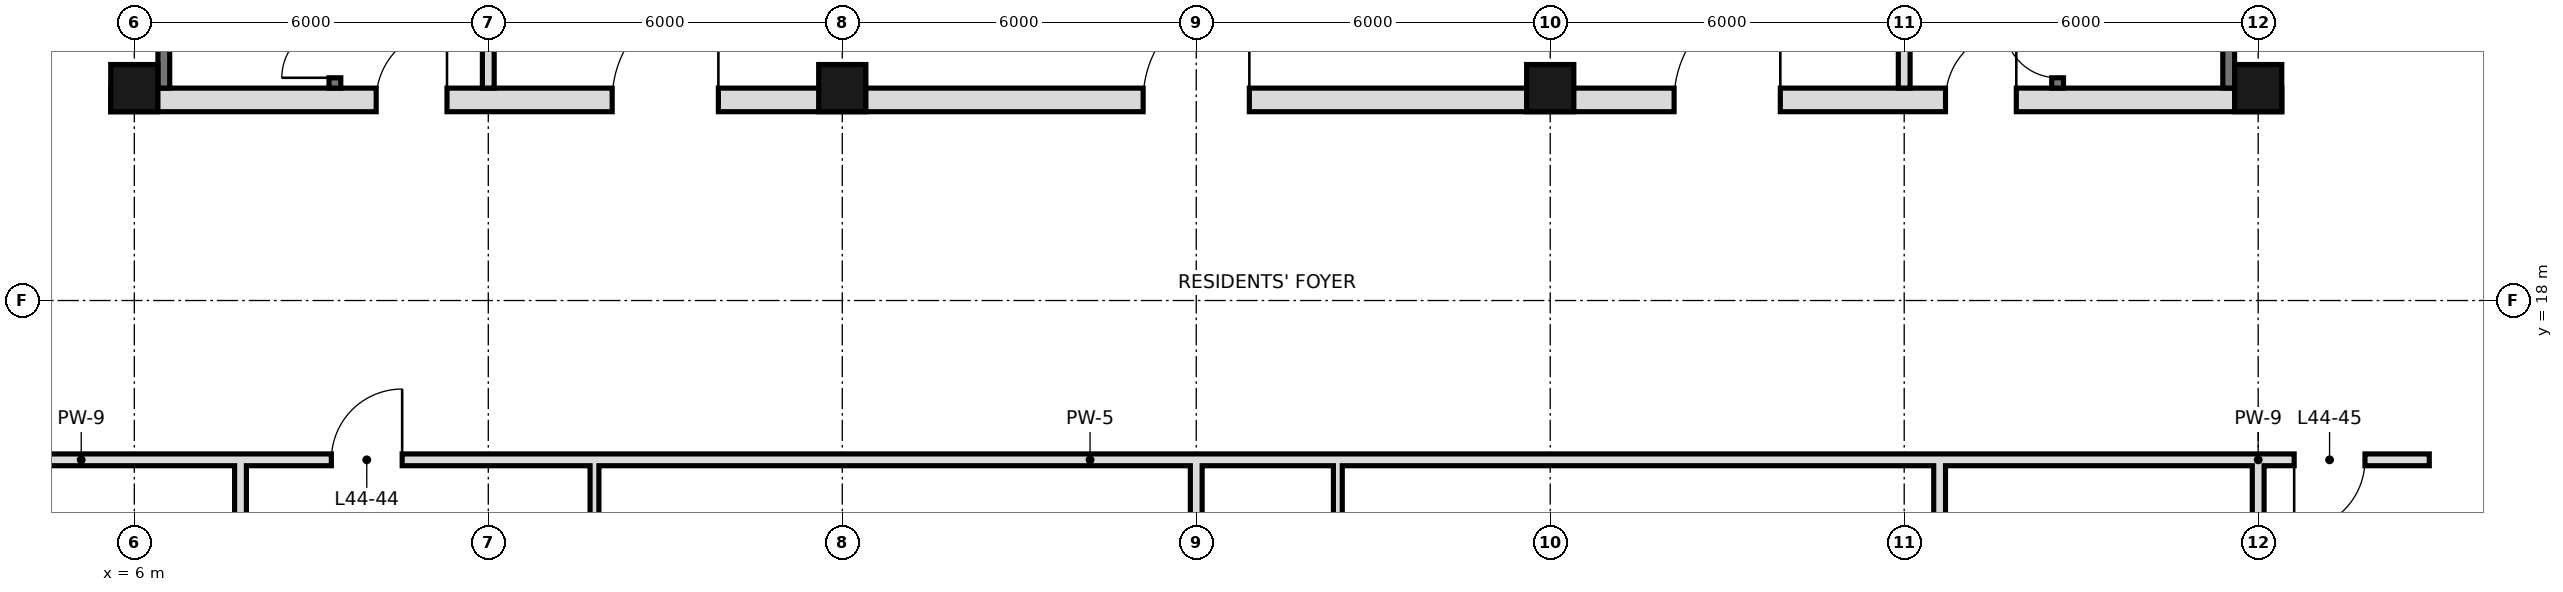
"""IFC4 building model, lengths in metres.
Left out: names, types, materials, properties, quantities, classifications, styles, units other than length and angle.
Written with IfcOpenShell. Run it as: python <this file> out.ifc"""

import sys

from ifc_helpers import new_model, si_unit, direction, frame, frame_2d, origin, origin_2d, place, context, subcontext, project, spatial, rectangle, hollow_rectangle, extrude, element, fill, save


model = new_model("IFC4")
c1 = context("Model", 3, precision=1e-05, world=origin(), true_north=direction((0.0, 1.0)))
c2 = subcontext(c1, "Body", "Model", "MODEL_VIEW")
j1 = project(units=[si_unit("LENGTHUNIT", "METRE"), si_unit("PLANEANGLEUNIT", "RADIAN")], contexts=[c1])
p1 = place(None, origin())
s1 = spatial("IfcSite", under=j1, at=p1, CompositionType="ELEMENT")
p2 = place(p1, origin())
s2 = spatial("IfcBuilding", under=s1, at=p2, CompositionType="ELEMENT")
p3 = place(p2, frame((0.0, 0.0, 192.0)))
s3 = spatial("IfcBuildingStorey", under=s2, at=p3, CompositionType="ELEMENT", Elevation=192.0)
for number, where, z_axis, x_axis in (
    (1, (6.0, 21.6, 0.0), (0.0, 0.0, 1.0), (1.0, 0.0, 0.0)),
    (2, (18.0, 21.6, 0.0), (0.0, 0.0, 1.0), (1.0, 0.0, 0.0)),
    (3, (30.0, 21.6, 0.0), (0.0, 0.0, 1.0), (1.0, 0.0, 0.0)),
    (4, (42.0, 21.6, 0.0), (0.0, 0.0, 1.0), (1.0, 0.0, 0.0)),
):
    element("IfcColumn", number, at=place(p3, frame(where, z_axis=z_axis, x_axis=x_axis)), inside=s3, PredefinedType="COLUMN", context=c2, shape_type="SweptSolid", body=[
        extrude(hollow_rectangle(XDim=0.8, YDim=0.8, WallThickness=0.045, at=origin_2d()), origin(), (0.0, 0.0, 1.0), 3.6),
    ])
p4 = place(p3, frame((13.8, 10.8, 0.0), z_axis=(0.0, 0.0, 1.0), x_axis=(0.0, 1.0, 0.0)))
e5 = element("IfcWall", 5, at=p4, inside=s3, PredefinedType="PARTITIONING", context=c2, shape_type="SweptSolid", body=[
    extrude(rectangle(XDim=4.5, YDim=0.15, at=frame_2d((2.25, 0.0))), origin(), (0.0, 0.0, 1.0), 3.42),
])
p5 = place(p3, frame((24.0, 0.0, 0.0), z_axis=(0.0, 0.0, 1.0), x_axis=(0.0, 1.0, 0.0)))
e6 = element("IfcWall", 6, at=p5, inside=s3, PredefinedType="SOLIDWALL", context=c2, shape_type="SweptSolid", body=[
    extrude(rectangle(XDim=15.3, YDim=0.2, at=frame_2d((7.65, 0.0))), origin(), (0.0, 0.0, 1.0), 2.72),
])
p6 = place(p3, frame((26.4, 10.8, 0.0), z_axis=(0.0, 0.0, 1.0), x_axis=(0.0, 1.0, 0.0)))
e7 = element("IfcWall", 7, at=p6, inside=s3, PredefinedType="PARTITIONING", context=c2, shape_type="SweptSolid", body=[
    extrude(rectangle(XDim=4.5, YDim=0.15, at=frame_2d((2.25, 0.0))), origin(), (0.0, 0.0, 1.0), 3.42),
])
for number, where, z_axis, x_axis in (
    (8, (36.6, 10.8, 0.0), (0.0, 0.0, 1.0), (0.0, 1.0, 0.0)),
    (9, (42.0, 10.8, 0.0), (0.0, 0.0, 1.0), (0.0, 1.0, 0.0)),
    (10, (7.8, 10.8, 0.0), (0.0, 0.0, 1.0), (0.0, 1.0, 0.0)),
):
    element("IfcWall", number, at=place(p3, frame(where, z_axis=z_axis, x_axis=x_axis)), inside=s3, PredefinedType="SOLIDWALL", context=c2, shape_type="SweptSolid", body=[
        extrude(rectangle(XDim=4.5, YDim=0.2, at=frame_2d((2.25, 0.0))), origin(), (0.0, 0.0, 1.0), 2.72),
    ])
p7 = place(p3, frame((7.8, 15.3, 0.0), z_axis=(0.0, 0.0, 1.0), x_axis=(1.0, 0.0, 0.0)))
e11 = element("IfcWall", 11, at=p7, inside=s3, PredefinedType="SOLIDWALL", context=c2, shape_type="SweptSolid", body=[
    extrude(rectangle(XDim=28.8, YDim=0.2, at=frame_2d((14.4, 0.0))), origin(), (0.0, 0.0, 1.0), 2.72),
])
p8 = place(p7, frame((1.54, 0.0, 0.0)))
e12 = element("IfcOpeningElement", 12, at=p8, cuts=e11, PredefinedType="OPENING", context=c2, shape_type="SweptSolid", body=[
    extrude(rectangle(XDim=1.2, YDim=2.4, at=frame_2d((0.6, 1.2))), frame((0.0, 0.11, 0.0), z_axis=(0.0, -1.0, 0.0), x_axis=(1.0, 0.0, 0.0)), (0.0, 0.0, 1.0), 0.22),
])
p9 = place(p3, frame((42.0, 15.3, 0.0), z_axis=(0.0, 0.0, 1.0), x_axis=(1.0, 0.0, 0.0)))
e13 = element("IfcWall", 13, at=p9, inside=s3, PredefinedType="SOLIDWALL", context=c2, shape_type="SweptSolid", body=[
    extrude(rectangle(XDim=2.9, YDim=0.2, at=frame_2d((1.45, 0.0))), origin(), (0.0, 0.0, 1.0), 2.72),
])
p10 = place(p9, frame((0.61, 0.0, 0.0)))
e14 = element("IfcOpeningElement", 14, at=p10, cuts=e13, PredefinedType="OPENING", context=c2, shape_type="SweptSolid", body=[
    extrude(rectangle(XDim=1.2, YDim=2.4, at=frame_2d((0.6, 1.2))), frame((0.0, 0.11, 0.0), z_axis=(0.0, -1.0, 0.0), x_axis=(1.0, 0.0, 0.0)), (0.0, 0.0, 1.0), 0.22),
])
p11 = place(p3, frame((3.1, 15.3, 0.0), z_axis=(0.0, 0.0, 1.0), x_axis=(1.0, 0.0, 0.0)))
e15 = element("IfcWall", 15, at=p11, inside=s3, PredefinedType="SOLIDWALL", context=c2, shape_type="SweptSolid", body=[
    extrude(rectangle(XDim=4.7, YDim=0.2, at=frame_2d((2.35, 0.0))), origin(), (0.0, 0.0, 1.0), 2.72),
])
p12 = place(p3, frame((36.6, 15.3, 0.0), z_axis=(0.0, 0.0, 1.0), x_axis=(1.0, 0.0, 0.0)))
e16 = element("IfcWall", 16, at=p12, inside=s3, PredefinedType="SOLIDWALL", context=c2, shape_type="SweptSolid", body=[
    extrude(rectangle(XDim=5.4, YDim=0.2, at=frame_2d((2.7, 0.0))), origin(), (0.0, 0.0, 1.0), 2.72),
])
for number, where, z_axis, x_axis in (
    (17, (6.5, 21.6, 0.0), (0.0, 0.0, 1.0), (0.0, 1.0, 0.0)),
    (18, (41.5, 21.6, 0.0), (0.0, 0.0, 1.0), (0.0, 1.0, 0.0)),
):
    element("IfcWall", number, at=place(p3, frame(where, z_axis=z_axis, x_axis=x_axis)), inside=s3, PredefinedType="SOLIDWALL", context=c2, shape_type="SweptSolid", body=[
        extrude(rectangle(XDim=23.5, YDim=0.2, at=frame_2d((11.75, 0.0))), origin(), (0.0, 0.0, 1.0), 3.42),
    ])
p13 = place(p3, frame((5.6, 21.4, 0.0), z_axis=(0.0, 0.0, 1.0), x_axis=(1.0, 0.0, 0.0)))
e19 = element("IfcWall", 19, at=p13, inside=s3, PredefinedType="SOLIDWALL", context=c2, shape_type="SweptSolid", body=[
    extrude(rectangle(XDim=36.8, YDim=0.4, at=frame_2d((18.4, 0.0))), origin(), (0.0, 0.0, 1.0), 3.42),
])
p14 = place(p13, frame((8.5, 0.0, 0.0)))
e20 = element("IfcOpeningElement", 20, at=p14, cuts=e19, PredefinedType="OPENING", context=c2, shape_type="SweptSolid", body=[
    extrude(rectangle(XDim=1.8, YDim=2.1, at=frame_2d((0.9, 1.05))), frame((0.0, 0.21, 0.0), z_axis=(0.0, -1.0, 0.0), x_axis=(1.0, 0.0, 0.0)), (0.0, 0.0, 1.0), 0.42),
])
p15 = place(p13, frame((17.5, 0.0, 0.0)))
e21 = element("IfcOpeningElement", 21, at=p15, cuts=e19, PredefinedType="OPENING", context=c2, shape_type="SweptSolid", body=[
    extrude(rectangle(XDim=1.8, YDim=2.1, at=frame_2d((0.9, 1.05))), frame((0.0, 0.21, 0.0), z_axis=(0.0, -1.0, 0.0), x_axis=(1.0, 0.0, 0.0)), (0.0, 0.0, 1.0), 0.42),
])
p16 = place(p13, frame((26.5, 0.0, 0.0)))
e22 = element("IfcOpeningElement", 22, at=p16, cuts=e19, PredefinedType="OPENING", context=c2, shape_type="SweptSolid", body=[
    extrude(rectangle(XDim=1.8, YDim=2.1, at=frame_2d((0.9, 1.05))), frame((0.0, 0.21, 0.0), z_axis=(0.0, -1.0, 0.0), x_axis=(1.0, 0.0, 0.0)), (0.0, 0.0, 1.0), 0.42),
])
p17 = place(p13, frame((4.5, 0.0, 0.0)))
e23 = element("IfcOpeningElement", 23, at=p17, cuts=e19, PredefinedType="OPENING", context=c2, shape_type="SweptSolid", body=[
    extrude(rectangle(XDim=1.2, YDim=2.1, at=frame_2d((0.6, 1.05))), frame((0.0, 0.21, 0.0), z_axis=(0.0, -1.0, 0.0), x_axis=(1.0, 0.0, 0.0)), (0.0, 0.0, 1.0), 0.42),
])
p18 = place(p13, frame((31.1, 0.0, 0.0)))
e24 = element("IfcOpeningElement", 24, at=p18, cuts=e19, PredefinedType="OPENING", context=c2, shape_type="SweptSolid", body=[
    extrude(rectangle(XDim=1.2, YDim=2.1, at=frame_2d((0.6, 1.05))), frame((0.0, 0.21, 0.0), z_axis=(0.0, -1.0, 0.0), x_axis=(1.0, 0.0, 0.0)), (0.0, 0.0, 1.0), 0.42),
])
for number, where, z_axis, x_axis in (
    (25, (12.0, 21.6, 0.0), (0.0, 0.0, 1.0), (0.0, 1.0, 0.0)),
    (26, (36.0, 21.6, 0.0), (0.0, 0.0, 1.0), (0.0, 1.0, 0.0)),
):
    element("IfcWall", number, at=place(p3, frame(where, z_axis=z_axis, x_axis=x_axis)), inside=s3, PredefinedType="PARTITIONING", context=c2, shape_type="SweptSolid", body=[
        extrude(rectangle(XDim=6.1, YDim=0.2, at=frame_2d((3.05, 0.0))), origin(), (0.0, 0.0, 1.0), 3.42),
    ])
p19 = place(p3, frame((38.6, 21.6, 0.0), z_axis=(0.0, 0.0, 1.0), x_axis=(0.0, 1.0, 0.0)))
e27 = element("IfcWall", 27, at=p19, inside=s3, PredefinedType="SOLIDWALL", context=c2, shape_type="SweptSolid", body=[
    extrude(rectangle(XDim=23.4, YDim=0.2, at=frame_2d((11.7, 0.0))), origin(), (0.0, 0.0, 1.0), 3.42),
])
p20 = place(p19, frame((7.0, 0.0, 0.0)))
e28 = element("IfcOpeningElement", 28, at=p20, cuts=e27, PredefinedType="OPENING", context=c2, shape_type="SweptSolid", body=[
    extrude(rectangle(XDim=1.1, YDim=2.1, at=frame_2d((0.55, 1.05))), frame((0.0, 0.11, 0.0), z_axis=(0.0, -1.0, 0.0), x_axis=(1.0, 0.0, 0.0)), (0.0, 0.0, 1.0), 0.22),
])
p21 = place(p19, frame((10.1, 0.0, 0.0)))
e29 = element("IfcOpeningElement", 29, at=p21, cuts=e27, PredefinedType="OPENING", context=c2, shape_type="SweptSolid", body=[
    extrude(rectangle(XDim=1.1, YDim=2.1, at=frame_2d((0.55, 1.05))), frame((0.0, 0.11, 0.0), z_axis=(0.0, -1.0, 0.0), x_axis=(1.0, 0.0, 0.0)), (0.0, 0.0, 1.0), 0.22),
])
p22 = place(p19, frame((13.2, 0.0, 0.0)))
e30 = element("IfcOpeningElement", 30, at=p22, cuts=e27, PredefinedType="OPENING", context=c2, shape_type="SweptSolid", body=[
    extrude(rectangle(XDim=1.1, YDim=2.1, at=frame_2d((0.55, 1.05))), frame((0.0, 0.11, 0.0), z_axis=(0.0, -1.0, 0.0), x_axis=(1.0, 0.0, 0.0)), (0.0, 0.0, 1.0), 0.22),
])
p23 = place(p19, frame((22.1, 0.0, 0.0)))
e31 = element("IfcOpeningElement", 31, at=p23, cuts=e27, PredefinedType="OPENING", context=c2, shape_type="SweptSolid", body=[
    extrude(rectangle(XDim=1.0, YDim=2.1, at=frame_2d((0.5, 1.05))), frame((0.0, 0.11, 0.0), z_axis=(0.0, -1.0, 0.0), x_axis=(1.0, 0.0, 0.0)), (0.0, 0.0, 1.0), 0.22),
])
p24 = place(p19, frame((0.175, 0.0, 0.0)))
e32 = element("IfcOpeningElement", 32, at=p24, cuts=e27, PredefinedType="OPENING", context=c2, shape_type="SweptSolid", body=[
    extrude(rectangle(XDim=0.9, YDim=2.1, at=frame_2d((0.45, 1.05))), frame((0.0, 0.11, 0.0), z_axis=(0.0, -1.0, 0.0), x_axis=(1.0, 0.0, 0.0)), (0.0, 0.0, 1.0), 0.22),
])
p25 = place(p3, frame((9.4, 21.6, 0.0), z_axis=(0.0, 0.0, 1.0), x_axis=(0.0, 1.0, 0.0)))
e33 = element("IfcWall", 33, at=p25, inside=s3, PredefinedType="SOLIDWALL", context=c2, shape_type="SweptSolid", body=[
    extrude(rectangle(XDim=23.4, YDim=0.2, at=frame_2d((11.7, 0.0))), origin(), (0.0, 0.0, 1.0), 3.42),
])
p26 = place(p25, frame((7.7, 0.0, 0.0)))
e34 = element("IfcOpeningElement", 34, at=p26, cuts=e33, PredefinedType="OPENING", context=c2, shape_type="SweptSolid", body=[
    extrude(rectangle(XDim=1.0, YDim=2.1, at=frame_2d((0.5, 1.05))), frame((0.0, 0.11, 0.0), z_axis=(0.0, -1.0, 0.0), x_axis=(1.0, 0.0, 0.0)), (0.0, 0.0, 1.0), 0.22),
])
p27 = place(p25, frame((12.35, 0.0, 0.0)))
e35 = element("IfcOpeningElement", 35, at=p27, cuts=e33, PredefinedType="OPENING", context=c2, shape_type="SweptSolid", body=[
    extrude(rectangle(XDim=1.0, YDim=2.1, at=frame_2d((0.5, 1.05))), frame((0.0, 0.11, 0.0), z_axis=(0.0, -1.0, 0.0), x_axis=(1.0, 0.0, 0.0)), (0.0, 0.0, 1.0), 0.22),
])
p28 = place(p25, frame((22.1, 0.0, 0.0)))
e36 = element("IfcOpeningElement", 36, at=p28, cuts=e33, PredefinedType="OPENING", context=c2, shape_type="SweptSolid", body=[
    extrude(rectangle(XDim=1.0, YDim=2.1, at=frame_2d((0.5, 1.05))), frame((0.0, 0.11, 0.0), z_axis=(0.0, -1.0, 0.0), x_axis=(1.0, 0.0, 0.0)), (0.0, 0.0, 1.0), 0.22),
])
p29 = place(p25, frame((0.175, 0.0, 0.0)))
e37 = element("IfcOpeningElement", 37, at=p29, cuts=e33, PredefinedType="OPENING", context=c2, shape_type="SweptSolid", body=[
    extrude(rectangle(XDim=0.9, YDim=2.1, at=frame_2d((0.45, 1.05))), frame((0.0, 0.11, 0.0), z_axis=(0.0, -1.0, 0.0), x_axis=(1.0, 0.0, 0.0)), (0.0, 0.0, 1.0), 0.22),
])
p30 = place(p8, frame((1.2, 0.0, 0.0), z_axis=(0.0, 0.0, 1.0), x_axis=(-1.0, 0.0, 0.0)))
e38 = element("IfcDoor", 38, at=p30, inside=s3, OperationType="SINGLE_SWING_LEFT", PredefinedType="DOOR", context=c2, shape_type="SweptSolid", body=[
    extrude(rectangle(XDim=1.2, YDim=2.4, at=frame_2d((0.6, 1.2))), frame((0.0, 0.025, 0.0), z_axis=(0.0, -1.0, 0.0), x_axis=(1.0, 0.0, 0.0)), (0.0, 0.0, 1.0), 0.05),
])
fill(e12, e38)
p31 = place(p10, frame((1.2, 0.0, 0.0), z_axis=(0.0, 0.0, 1.0), x_axis=(-1.0, 0.0, 0.0)))
e39 = element("IfcDoor", 39, at=p31, inside=s3, OperationType="SINGLE_SWING_RIGHT", PredefinedType="DOOR", context=c2, shape_type="SweptSolid", body=[
    extrude(rectangle(XDim=1.2, YDim=2.4, at=frame_2d((0.6, 1.2))), frame((0.0, 0.025, 0.0), z_axis=(0.0, -1.0, 0.0), x_axis=(1.0, 0.0, 0.0)), (0.0, 0.0, 1.0), 0.05),
])
fill(e14, e39)
p32 = place(p14, frame((1.8, 0.0, 0.0), z_axis=(0.0, 0.0, 1.0), x_axis=(-1.0, 0.0, 0.0)))
e40 = element("IfcDoor", 40, at=p32, inside=s3, OperationType="SINGLE_SWING_LEFT", PredefinedType="DOOR", context=c2, shape_type="SweptSolid", body=[
    extrude(rectangle(XDim=1.8, YDim=2.1, at=frame_2d((0.9, 1.05))), frame((0.0, 0.025, 0.0), z_axis=(0.0, -1.0, 0.0), x_axis=(1.0, 0.0, 0.0)), (0.0, 0.0, 1.0), 0.05),
])
fill(e20, e40)
p33 = place(p15, frame((1.8, 0.0, 0.0), z_axis=(0.0, 0.0, 1.0), x_axis=(-1.0, 0.0, 0.0)))
e41 = element("IfcDoor", 41, at=p33, inside=s3, OperationType="SINGLE_SWING_LEFT", PredefinedType="DOOR", context=c2, shape_type="SweptSolid", body=[
    extrude(rectangle(XDim=1.8, YDim=2.1, at=frame_2d((0.9, 1.05))), frame((0.0, 0.025, 0.0), z_axis=(0.0, -1.0, 0.0), x_axis=(1.0, 0.0, 0.0)), (0.0, 0.0, 1.0), 0.05),
])
fill(e21, e41)
p34 = place(p16, frame((1.8, 0.0, 0.0), z_axis=(0.0, 0.0, 1.0), x_axis=(-1.0, 0.0, 0.0)))
e42 = element("IfcDoor", 42, at=p34, inside=s3, OperationType="SINGLE_SWING_LEFT", PredefinedType="DOOR", context=c2, shape_type="SweptSolid", body=[
    extrude(rectangle(XDim=1.8, YDim=2.1, at=frame_2d((0.9, 1.05))), frame((0.0, 0.025, 0.0), z_axis=(0.0, -1.0, 0.0), x_axis=(1.0, 0.0, 0.0)), (0.0, 0.0, 1.0), 0.05),
])
fill(e22, e42)
p35 = place(p17, frame((1.2, 0.0, 0.0), z_axis=(0.0, 0.0, 1.0), x_axis=(-1.0, 0.0, 0.0)))
e43 = element("IfcDoor", 43, at=p35, inside=s3, OperationType="SINGLE_SWING_LEFT", PredefinedType="DOOR", context=c2, shape_type="SweptSolid", body=[
    extrude(rectangle(XDim=1.2, YDim=2.1, at=frame_2d((0.6, 1.05))), frame((0.0, 0.025, 0.0), z_axis=(0.0, -1.0, 0.0), x_axis=(1.0, 0.0, 0.0)), (0.0, 0.0, 1.0), 0.05),
])
fill(e23, e43)
p36 = place(p18, frame((1.2, 0.0, 0.0), z_axis=(0.0, 0.0, 1.0), x_axis=(-1.0, 0.0, 0.0)))
e44 = element("IfcDoor", 44, at=p36, inside=s3, OperationType="SINGLE_SWING_LEFT", PredefinedType="DOOR", context=c2, shape_type="SweptSolid", body=[
    extrude(rectangle(XDim=1.2, YDim=2.1, at=frame_2d((0.6, 1.05))), frame((0.0, 0.025, 0.0), z_axis=(0.0, -1.0, 0.0), x_axis=(1.0, 0.0, 0.0)), (0.0, 0.0, 1.0), 0.05),
])
fill(e24, e44)
p37 = place(p29, origin())
e45 = element("IfcDoor", 45, at=p37, inside=s3, OperationType="SINGLE_SWING_LEFT", PredefinedType="DOOR", context=c2, shape_type="SweptSolid", body=[
    extrude(rectangle(XDim=0.9, YDim=2.1, at=frame_2d((0.45, 1.05))), frame((0.0, 0.025, 0.0), z_axis=(0.0, -1.0, 0.0), x_axis=(1.0, 0.0, 0.0)), (0.0, 0.0, 1.0), 0.05),
])
fill(e37, e45)
p38 = place(p24, frame((0.9, 0.0, 0.0), z_axis=(0.0, 0.0, 1.0), x_axis=(-1.0, 0.0, 0.0)))
e46 = element("IfcDoor", 46, at=p38, inside=s3, OperationType="SINGLE_SWING_LEFT", PredefinedType="DOOR", context=c2, shape_type="SweptSolid", body=[
    extrude(rectangle(XDim=0.9, YDim=2.1, at=frame_2d((0.45, 1.05))), frame((0.0, 0.025, 0.0), z_axis=(0.0, -1.0, 0.0), x_axis=(1.0, 0.0, 0.0)), (0.0, 0.0, 1.0), 0.05),
])
fill(e32, e46)
save(model, sys.argv[1])
